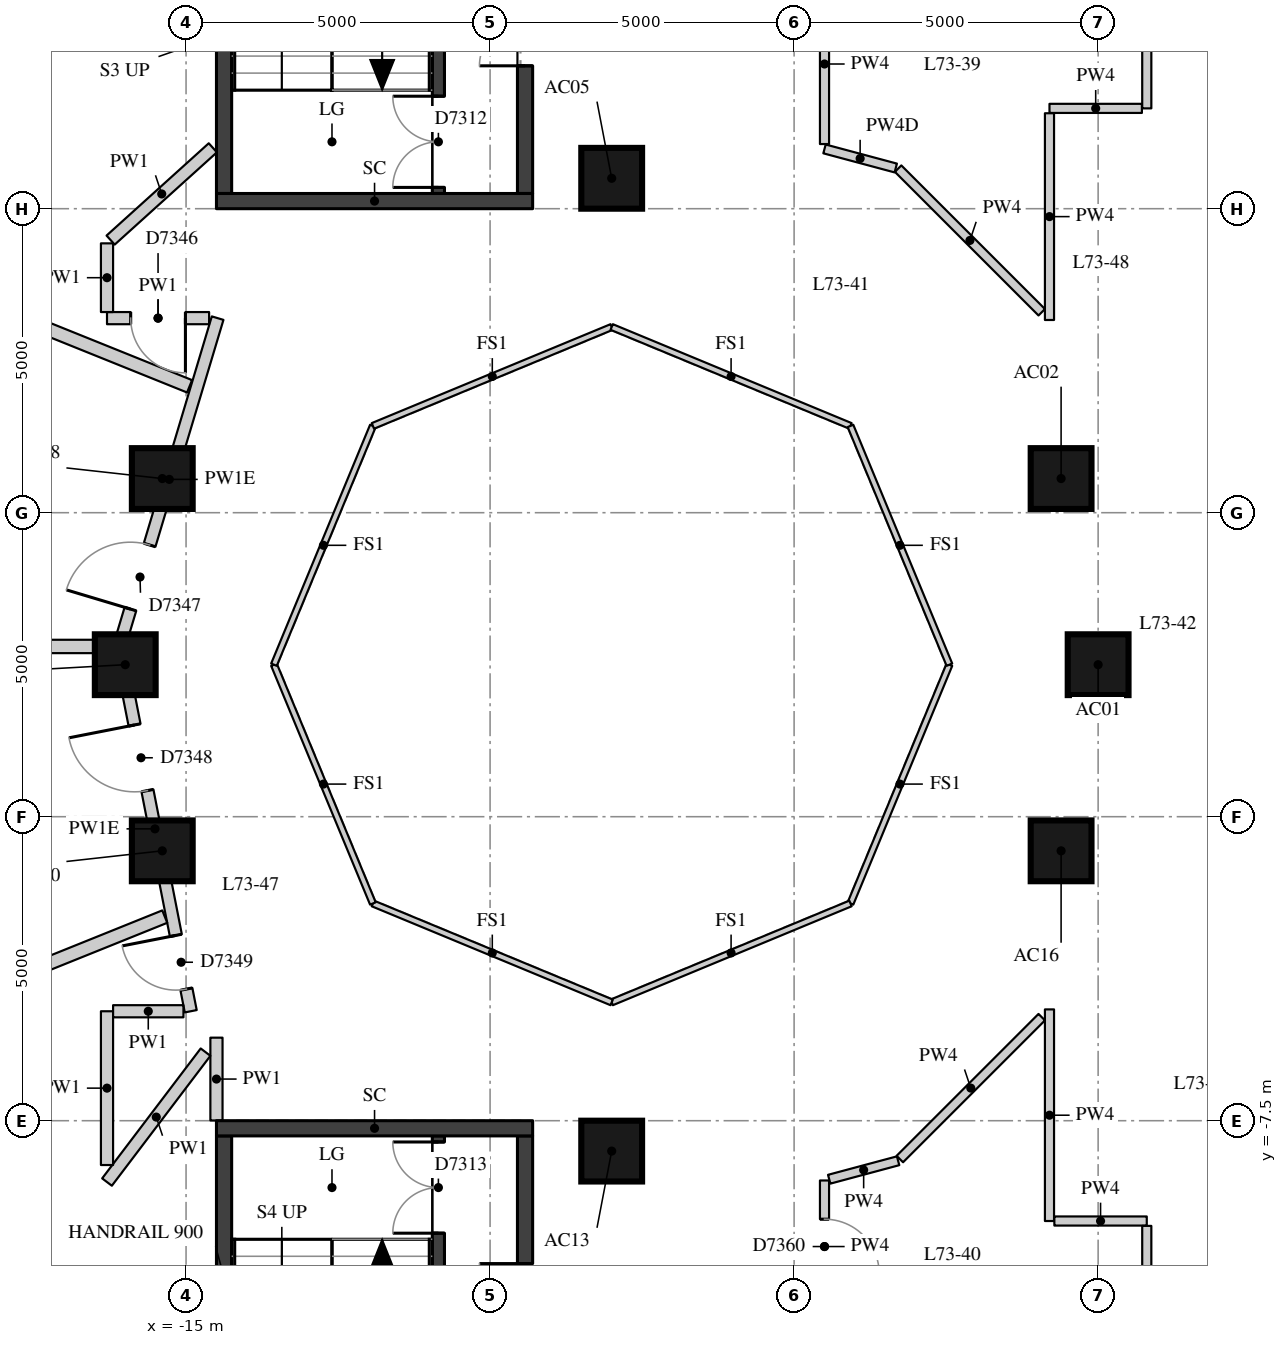
"""IFC4 building model, lengths in metres.
Left out: names, types, materials, properties, quantities, classifications, styles, units other than length and angle.
Written with IfcOpenShell. Run it as: python <this file> out.ifc"""

import sys

from ifc_helpers import new_model, si_unit, direction, frame, frame_2d, origin, origin_2d, place, context, subcontext, project, spatial, rectangle, extrude, element, fill, save


model = new_model("IFC4")
c1 = context("Model", 3, precision=1e-05, world=origin(), true_north=direction((0.0, 1.0)))
c2 = subcontext(c1, "Body", "Model", "MODEL_VIEW")
j1 = project(units=[si_unit("LENGTHUNIT", "METRE"), si_unit("PLANEANGLEUNIT", "RADIAN")], contexts=[c1])
p1 = place(None, origin())
s1 = spatial("IfcSite", under=j1, at=p1, CompositionType="ELEMENT")
p2 = place(p1, origin())
s2 = spatial("IfcBuilding", under=s1, at=p2, CompositionType="ELEMENT")
p3 = place(p2, frame((0.0, 0.0, 256.4)))
s3 = spatial("IfcBuildingStorey", under=s2, at=p3, CompositionType="ELEMENT", Elevation=256.4)
for number, where, z_axis, x_axis in (
    (1, (0.0, 0.0, 0.0), (0.0, 0.0, 1.0), (1.0, 0.0, 0.0)),
    (2, (-0.609, 3.062, 0.0), (0.0, 0.0, 1.0), (1.0, 0.0, 0.0)),
    (3, (-8.0, 8.0, 0.0), (0.0, 0.0, 1.0), (1.0, 0.0, 0.0)),
    (4, (-15.391, 3.062, 0.0), (0.0, 0.0, 1.0), (1.0, 0.0, 0.0)),
    (5, (-16.0, 0.0, 0.0), (0.0, 0.0, 1.0), (1.0, 0.0, 0.0)),
    (6, (-15.391, -3.062, 0.0), (0.0, 0.0, 1.0), (1.0, 0.0, 0.0)),
    (7, (-8.0, -8.0, 0.0), (0.0, 0.0, 1.0), (1.0, 0.0, 0.0)),
    (8, (-0.609, -3.062, 0.0), (0.0, 0.0, 1.0), (1.0, 0.0, 0.0)),
):
    element("IfcColumn", number, at=place(p3, frame(where, z_axis=z_axis, x_axis=x_axis)), inside=s3, PredefinedType="COLUMN", context=c2, shape_type="SweptSolid", body=[
        extrude(rectangle(XDim=1.0, YDim=1.0, at=origin_2d()), origin(), (0.0, 0.0, 1.0), 3.3),
    ])
p4 = place(p3, frame((-10.85, 7.75, 0.0), z_axis=(0.0, 0.0, 1.0), x_axis=(0.0, 1.0, 0.0)))
e9 = element("IfcWall", 9, at=p4, inside=s3, PredefinedType="SHEAR", context=c2, shape_type="SweptSolid", body=[
    extrude(rectangle(XDim=6.0, YDim=0.2, at=frame_2d((3.0, 0.0))), origin(), (0.0, 0.0, 1.0), 2.95),
])
p5 = place(p4, frame((0.1, 0.0, 0.0)))
e10 = element("IfcOpeningElement", 10, at=p5, cuts=e9, PredefinedType="OPENING", context=c2, shape_type="SweptSolid", body=[
    extrude(rectangle(XDim=1.5, YDim=2.1, at=frame_2d((0.75, 1.05))), frame((0.0, 0.11, 0.0), z_axis=(0.0, -1.0, 0.0), x_axis=(1.0, 0.0, 0.0)), (0.0, 0.0, 1.0), 0.22),
])
p6 = place(p3, frame((-10.85, -13.75, 0.0), z_axis=(0.0, 0.0, 1.0), x_axis=(0.0, 1.0, 0.0)))
e11 = element("IfcWall", 11, at=p6, inside=s3, PredefinedType="SHEAR", context=c2, shape_type="SweptSolid", body=[
    extrude(rectangle(XDim=6.0, YDim=0.2, at=frame_2d((3.0, 0.0))), origin(), (0.0, 0.0, 1.0), 2.95),
])
p7 = place(p6, frame((4.4, 0.0, 0.0)))
e12 = element("IfcOpeningElement", 12, at=p7, cuts=e11, PredefinedType="OPENING", context=c2, shape_type="SweptSolid", body=[
    extrude(rectangle(XDim=1.5, YDim=2.1, at=frame_2d((0.75, 1.05))), frame((0.0, 0.11, 0.0), z_axis=(0.0, -1.0, 0.0), x_axis=(1.0, 0.0, 0.0)), (0.0, 0.0, 1.0), 0.22),
])
p8 = place(p3, frame((-14.375, 7.75, -0.28), z_axis=(0.0, 0.0, 1.0), x_axis=(0.0, 1.0, 0.0)))
e13 = element("IfcWall", 13, at=p8, inside=s3, PredefinedType="SHEAR", context=c2, shape_type="SweptSolid", body=[
    extrude(rectangle(XDim=6.0, YDim=0.25, at=frame_2d((3.0, 0.0))), origin(), (0.0, 0.0, 1.0), 3.23),
])
p9 = place(p3, frame((-9.425, 7.75, -0.28), z_axis=(0.0, 0.0, 1.0), x_axis=(0.0, 1.0, 0.0)))
e14 = element("IfcWall", 14, at=p9, inside=s3, PredefinedType="SHEAR", context=c2, shape_type="SweptSolid", body=[
    extrude(rectangle(XDim=6.0, YDim=0.25, at=frame_2d((3.0, 0.0))), origin(), (0.0, 0.0, 1.0), 3.23),
])
p10 = place(p9, frame((2.1, 0.0, 0.28)))
e15 = element("IfcOpeningElement", 15, at=p10, cuts=e14, PredefinedType="OPENING", context=c2, shape_type="SweptSolid", body=[
    extrude(rectangle(XDim=1.5, YDim=2.1, at=frame_2d((0.75, 1.05))), frame((0.0, 0.135, 0.0), z_axis=(0.0, -1.0, 0.0), x_axis=(1.0, 0.0, 0.0)), (0.0, 0.0, 1.0), 0.27),
])
p11 = place(p3, frame((-14.5, 7.625, -0.28), z_axis=(0.0, 0.0, 1.0), x_axis=(1.0, 0.0, 0.0)))
e16 = element("IfcWall", 16, at=p11, inside=s3, PredefinedType="SHEAR", context=c2, shape_type="SweptSolid", body=[
    extrude(rectangle(XDim=5.2, YDim=0.25, at=frame_2d((2.6, 0.0))), origin(), (0.0, 0.0, 1.0), 3.23),
])
p12 = place(p3, frame((-14.375, -13.75, -0.28), z_axis=(0.0, 0.0, 1.0), x_axis=(0.0, 1.0, 0.0)))
e17 = element("IfcWall", 17, at=p12, inside=s3, PredefinedType="SHEAR", context=c2, shape_type="SweptSolid", body=[
    extrude(rectangle(XDim=6.0, YDim=0.25, at=frame_2d((3.0, 0.0))), origin(), (0.0, 0.0, 1.0), 3.23),
])
p13 = place(p3, frame((-9.425, -13.75, -0.28), z_axis=(0.0, 0.0, 1.0), x_axis=(0.0, 1.0, 0.0)))
e18 = element("IfcWall", 18, at=p13, inside=s3, PredefinedType="SHEAR", context=c2, shape_type="SweptSolid", body=[
    extrude(rectangle(XDim=6.0, YDim=0.25, at=frame_2d((3.0, 0.0))), origin(), (0.0, 0.0, 1.0), 3.23),
])
p14 = place(p13, frame((2.4, 0.0, 0.28)))
e19 = element("IfcOpeningElement", 19, at=p14, cuts=e18, PredefinedType="OPENING", context=c2, shape_type="SweptSolid", body=[
    extrude(rectangle(XDim=1.5, YDim=2.1, at=frame_2d((0.75, 1.05))), frame((0.0, 0.135, 0.0), z_axis=(0.0, -1.0, 0.0), x_axis=(1.0, 0.0, 0.0)), (0.0, 0.0, 1.0), 0.27),
])
p15 = place(p3, frame((-14.5, -7.625, -0.28), z_axis=(0.0, 0.0, 1.0), x_axis=(1.0, 0.0, 0.0)))
e20 = element("IfcWall", 20, at=p15, inside=s3, PredefinedType="SHEAR", context=c2, shape_type="SweptSolid", body=[
    extrude(rectangle(XDim=5.2, YDim=0.25, at=frame_2d((2.6, 0.0))), origin(), (0.0, 0.0, 1.0), 3.23),
])
p16 = place(p3, frame((-14.923, -5.7, 0.0), z_axis=(0.0, 0.0, 1.0), x_axis=(-0.192536596074, 0.981289793676, 0.0)))
e21 = element("IfcWall", 21, at=p16, inside=s3, PredefinedType="PARTITIONING", context=c2, shape_type="SweptSolid", body=[
    extrude(rectangle(XDim=6.115, YDim=0.2, at=frame_2d((3.057, 0.0))), origin(), (0.0, 0.0, 1.0), 2.45),
])
p17 = place(p16, frame((3.699, 0.0, 0.0)))
e22 = element("IfcOpeningElement", 22, at=p17, cuts=e21, PredefinedType="OPENING", context=c2, shape_type="SweptSolid", body=[
    extrude(rectangle(XDim=1.1, YDim=2.1, at=frame_2d((0.55, 1.05))), frame((0.0, 0.11, 0.0), z_axis=(0.0, -1.0, 0.0), x_axis=(1.0, 0.0, 0.0)), (0.0, 0.0, 1.0), 0.22),
])
p18 = place(p16, frame((0.372, 0.0, 0.0)))
e23 = element("IfcOpeningElement", 23, at=p18, cuts=e21, PredefinedType="OPENING", context=c2, shape_type="SweptSolid", body=[
    extrude(rectangle(XDim=0.9, YDim=2.1, at=frame_2d((0.45, 1.05))), frame((0.0, 0.11, 0.0), z_axis=(0.0, -1.0, 0.0), x_axis=(1.0, 0.0, 0.0)), (0.0, 0.0, 1.0), 0.22),
])
p19 = place(p3, frame((-16.071, 0.395, 0.0), z_axis=(0.0, 0.0, 1.0), x_axis=(0.287129472402, 0.957891782029, 0.0)))
e24 = element("IfcWall", 24, at=p19, inside=s3, PredefinedType="PARTITIONING", context=c2, shape_type="SweptSolid", body=[
    extrude(rectangle(XDim=5.538, YDim=0.2, at=frame_2d((2.769, 0.0))), origin(), (0.0, 0.0, 1.0), 2.45),
])
p20 = place(p19, frame((0.543, 0.0, 0.0)))
e25 = element("IfcOpeningElement", 25, at=p20, cuts=e24, PredefinedType="OPENING", context=c2, shape_type="SweptSolid", body=[
    extrude(rectangle(XDim=1.1, YDim=2.1, at=frame_2d((0.55, 1.05))), frame((0.0, 0.11, 0.0), z_axis=(0.0, -1.0, 0.0), x_axis=(1.0, 0.0, 0.0)), (0.0, 0.0, 1.0), 0.22),
])
p21 = place(p3, frame((-14.621, 5.7, 0.0), z_axis=(0.0, 0.0, 1.0), x_axis=(-1.0, 0.0, 0.0)))
e26 = element("IfcWall", 26, at=p21, inside=s3, PredefinedType="PARTITIONING", context=c2, shape_type="SweptSolid", body=[
    extrude(rectangle(XDim=1.679, YDim=0.2, at=frame_2d((0.84, 0.0))), origin(), (0.0, 0.0, 1.0), 2.95),
])
p22 = place(p21, frame((0.39, 0.0, 0.0)))
e27 = element("IfcOpeningElement", 27, at=p22, cuts=e26, PredefinedType="OPENING", context=c2, shape_type="SweptSolid", body=[
    extrude(rectangle(XDim=0.9, YDim=2.1, at=frame_2d((0.45, 1.05))), frame((0.0, 0.11, 0.0), z_axis=(0.0, -1.0, 0.0), x_axis=(1.0, 0.0, 0.0)), (0.0, 0.0, 1.0), 0.22),
])
p23 = place(p3, frame((-16.3, 5.8, 0.0), z_axis=(0.0, 0.0, 1.0), x_axis=(0.0, 1.0, 0.0)))
e28 = element("IfcWall", 28, at=p23, inside=s3, PredefinedType="PARTITIONING", context=c2, shape_type="SweptSolid", body=[
    extrude(rectangle(XDim=1.13, YDim=0.2, at=frame_2d((0.565, 0.0))), origin(), (0.0, 0.0, 1.0), 2.95),
])
p24 = place(p3, frame((-16.24, 6.984, 0.0), z_axis=(0.0, 0.0, 1.0), x_axis=(0.742140692687, 0.67024412885, 0.0)))
e29 = element("IfcWall", 29, at=p24, inside=s3, PredefinedType="PARTITIONING", context=c2, shape_type="SweptSolid", body=[
    extrude(rectangle(XDim=2.265, YDim=0.2, at=frame_2d((1.132, 0.0))), origin(), (0.0, 0.0, 1.0), 2.95),
])
p25 = place(p3, frame((-14.5, -7.496, 0.0), z_axis=(0.0, 0.0, 1.0), x_axis=(0.0, 1.0, 0.0)))
e30 = element("IfcWall", 30, at=p25, inside=s3, PredefinedType="PARTITIONING", context=c2, shape_type="SweptSolid", body=[
    extrude(rectangle(XDim=1.362, YDim=0.2, at=frame_2d((0.681, 0.0))), origin(), (0.0, 0.0, 1.0), 2.95),
])
p26 = place(p3, frame((-14.679, -6.372, 0.0), z_axis=(0.0, 0.0, 1.0), x_axis=(-0.604258962547, -0.796787993247, 0.0)))
e31 = element("IfcWall", 31, at=p26, inside=s3, PredefinedType="PARTITIONING", context=c2, shape_type="SweptSolid", body=[
    extrude(rectangle(XDim=2.682, YDim=0.2, at=frame_2d((1.341, 0.0))), origin(), (0.0, 0.0, 1.0), 2.95),
])
p27 = place(p3, frame((-16.3, -8.229, 0.0), z_axis=(0.0, 0.0, 1.0), x_axis=(0.0, 1.0, 0.0)))
e32 = element("IfcWall", 32, at=p27, inside=s3, PredefinedType="PARTITIONING", context=c2, shape_type="SweptSolid", body=[
    extrude(rectangle(XDim=2.529, YDim=0.2, at=frame_2d((1.265, 0.0))), origin(), (0.0, 0.0, 1.0), 2.95),
])
p28 = place(p3, frame((-16.2, -5.7, 0.0), z_axis=(0.0, 0.0, 1.0), x_axis=(1.0, 0.0, 0.0)))
e33 = element("IfcWall", 33, at=p28, inside=s3, PredefinedType="PARTITIONING", context=c2, shape_type="SweptSolid", body=[
    extrude(rectangle(XDim=1.157, YDim=0.2, at=frame_2d((0.579, 0.0))), origin(), (0.0, 0.0, 1.0), 2.95),
])
p29 = place(p3, frame((0.8, 12.057, 0.0), z_axis=(0.0, 0.0, 1.0), x_axis=(0.0, -1.0, 0.0)))
e34 = element("IfcWall", 34, at=p29, inside=s3, PredefinedType="PARTITIONING", context=c2, shape_type="SweptSolid", body=[
    extrude(rectangle(XDim=2.907, YDim=0.15, at=frame_2d((1.454, 0.0))), origin(), (0.0, 0.0, 1.0), 2.95),
])
p30 = place(p29, frame((1.003, 0.0, 0.0)))
e35 = element("IfcOpeningElement", 35, at=p30, cuts=e34, PredefinedType="OPENING", context=c2, shape_type="SweptSolid", body=[
    extrude(rectangle(XDim=0.9, YDim=2.1, at=frame_2d((0.45, 1.05))), frame((0.0, 0.085, 0.0), z_axis=(0.0, -1.0, 0.0), x_axis=(1.0, 0.0, 0.0)), (0.0, 0.0, 1.0), 0.17),
])
p31 = place(p3, frame((0.72, 9.15, 0.0), z_axis=(0.0, 0.0, 1.0), x_axis=(-1.0, 0.0, 0.0)))
e36 = element("IfcWall", 36, at=p31, inside=s3, PredefinedType="PARTITIONING", context=c2, shape_type="SweptSolid", body=[
    extrude(rectangle(XDim=1.52, YDim=0.15, at=frame_2d((0.76, 0.0))), origin(), (0.0, 0.0, 1.0), 2.95),
])
p32 = place(p3, frame((-0.8, 9.07, 0.0), z_axis=(0.0, 0.0, 1.0), x_axis=(0.0, -1.0, 0.0)))
e37 = element("IfcWall", 37, at=p32, inside=s3, PredefinedType="PARTITIONING", context=c2, shape_type="SweptSolid", body=[
    extrude(rectangle(XDim=3.4, YDim=0.15, at=frame_2d((1.7, 0.0))), origin(), (0.0, 0.0, 1.0), 2.95),
])
p33 = place(p3, frame((-0.927, 5.797, 0.0), z_axis=(0.0, 0.0, 1.0), x_axis=(-0.707106781187, 0.707106781187, 0.0)))
e38 = element("IfcWall", 38, at=p33, inside=s3, PredefinedType="PARTITIONING", context=c2, shape_type="SweptSolid", body=[
    extrude(rectangle(XDim=3.341, YDim=0.15, at=frame_2d((1.67, 0.0))), origin(), (0.0, 0.0, 1.0), 2.95),
])
p34 = place(p3, frame((-3.328, 8.169, 0.0), z_axis=(0.0, 0.0, 1.0), x_axis=(-0.965933680277, 0.258789731841, 0.0)))
e39 = element("IfcWall", 39, at=p34, inside=s3, PredefinedType="PARTITIONING", context=c2, shape_type="SweptSolid", body=[
    extrude(rectangle(XDim=1.213, YDim=0.15, at=frame_2d((0.606, 0.0))), origin(), (0.0, 0.0, 1.0), 2.4),
])
p35 = place(p3, frame((-4.5, 8.563, 0.0), z_axis=(0.0, 0.0, 1.0), x_axis=(0.0, 1.0, 0.0)))
e40 = element("IfcWall", 40, at=p35, inside=s3, PredefinedType="PARTITIONING", context=c2, shape_type="SweptSolid", body=[
    extrude(rectangle(XDim=2.633, YDim=0.15, at=frame_2d((1.316, 0.0))), origin(), (0.0, 0.0, 1.0), 2.95),
])
p36 = place(p3, frame((-0.8, -5.669, 0.0), z_axis=(0.0, 0.0, 1.0), x_axis=(0.0, -1.0, 0.0)))
e41 = element("IfcWall", 41, at=p36, inside=s3, PredefinedType="PARTITIONING", context=c2, shape_type="SweptSolid", body=[
    extrude(rectangle(XDim=3.48, YDim=0.15, at=frame_2d((1.74, 0.0))), origin(), (0.0, 0.0, 1.0), 2.95),
])
p37 = place(p3, frame((-0.72, -9.15, 0.0), z_axis=(0.0, 0.0, 1.0), x_axis=(1.0, 0.0, 0.0)))
e42 = element("IfcWall", 42, at=p37, inside=s3, PredefinedType="PARTITIONING", context=c2, shape_type="SweptSolid", body=[
    extrude(rectangle(XDim=1.52, YDim=0.15, at=frame_2d((0.76, 0.0))), origin(), (0.0, 0.0, 1.0), 2.95),
])
p38 = place(p3, frame((0.8, -9.23, 0.0), z_axis=(0.0, 0.0, 1.0), x_axis=(0.0, -1.0, 0.0)))
e43 = element("IfcWall", 43, at=p38, inside=s3, PredefinedType="PARTITIONING", context=c2, shape_type="SweptSolid", body=[
    extrude(rectangle(XDim=1.934, YDim=0.15, at=frame_2d((0.967, 0.0))), origin(), (0.0, 0.0, 1.0), 2.95),
])
p39 = place(p3, frame((-4.5, -10.656, 0.0), z_axis=(0.0, 0.0, 1.0), x_axis=(0.0, 1.0, 0.0)))
e44 = element("IfcWall", 44, at=p39, inside=s3, PredefinedType="PARTITIONING", context=c2, shape_type="SweptSolid", body=[
    extrude(rectangle(XDim=2.173, YDim=0.15, at=frame_2d((1.087, 0.0))), origin(), (0.0, 0.0, 1.0), 2.95),
])
p40 = place(p39, frame((0.637, 0.0, 0.0)))
e45 = element("IfcOpeningElement", 45, at=p40, cuts=e44, PredefinedType="OPENING", context=c2, shape_type="SweptSolid", body=[
    extrude(rectangle(XDim=0.9, YDim=2.1, at=frame_2d((0.45, 1.05))), frame((0.0, 0.085, 0.0), z_axis=(0.0, -1.0, 0.0), x_axis=(1.0, 0.0, 0.0)), (0.0, 0.0, 1.0), 0.17),
])
p41 = place(p3, frame((-4.423, -8.463, 0.0), z_axis=(0.0, 0.0, 1.0), x_axis=(0.965916469839, 0.258853961327, 0.0)))
e46 = element("IfcWall", 46, at=p41, inside=s3, PredefinedType="PARTITIONING", context=c2, shape_type="SweptSolid", body=[
    extrude(rectangle(XDim=1.173, YDim=0.15, at=frame_2d((0.587, 0.0))), origin(), (0.0, 0.0, 1.0), 2.95),
])
p42 = place(p3, frame((-3.261, -8.131, 0.0), z_axis=(0.0, 0.0, 1.0), x_axis=(0.707106781187, 0.707106781187, 0.0)))
e47 = element("IfcWall", 47, at=p42, inside=s3, PredefinedType="PARTITIONING", context=c2, shape_type="SweptSolid", body=[
    extrude(rectangle(XDim=3.3, YDim=0.15, at=frame_2d((1.65, 0.0))), origin(), (0.0, 0.0, 1.0), 2.95),
])
p43 = place(p3, frame((-22.004, 7.424, 0.0), z_axis=(0.0, 0.0, 1.0), x_axis=(0.927533826991, -0.373739213607, 0.0)))
e48 = element("IfcWall", 48, at=p43, inside=s3, PredefinedType="PARTITIONING", context=c2, shape_type="SweptSolid", body=[
    extrude(rectangle(XDim=7.614, YDim=0.22, at=frame_2d((3.807, 0.0))), origin(), (0.0, 0.0, 1.0), 2.95),
])
p44 = place(p3, frame((-23.4, 0.3, 0.0), z_axis=(0.0, 0.0, 1.0), x_axis=(1.0, 0.0, 0.0)))
e49 = element("IfcWall", 49, at=p44, inside=s3, PredefinedType="PARTITIONING", context=c2, shape_type="SweptSolid", body=[
    extrude(rectangle(XDim=7.2, YDim=0.22, at=frame_2d((3.6, 0.0))), origin(), (0.0, 0.0, 1.0), 2.4),
])
p45 = place(p3, frame((-22.004, -6.824, 0.0), z_axis=(0.0, 0.0, 1.0), x_axis=(0.927530164265, 0.373748303513, 0.0)))
e50 = element("IfcWall", 50, at=p45, inside=s3, PredefinedType="PARTITIONING", context=c2, shape_type="SweptSolid", body=[
    extrude(rectangle(XDim=7.174, YDim=0.22, at=frame_2d((3.587, 0.0))), origin(), (0.0, 0.0, 1.0), 2.95),
])
for number, where, z_axis, x_axis in (
    (51, (-2.446, 0.0, 0.0), (0.0, 0.0, 1.0), (-0.383, -0.924, 0.0)),
    (52, (-4.073, -3.927, 0.0), (0.0, 0.0, 1.0), (-0.924, -0.383, 0.0)),
    (53, (-8.0, -5.554, 0.0), (0.0, 0.0, 1.0), (-0.924, 0.383, 0.0)),
    (54, (-11.927, -3.927, 0.0), (0.0, 0.0, 1.0), (-0.383, 0.924, 0.0)),
    (55, (-13.554, 0.0, 0.0), (0.0, 0.0, 1.0), (0.383, 0.924, 0.0)),
    (56, (-11.927, 3.927, 0.0), (0.0, 0.0, 1.0), (0.924, 0.383, 0.0)),
    (57, (-8.0, 5.554, 0.0), (0.0, 0.0, 1.0), (0.924, -0.383, 0.0)),
    (58, (-4.073, 3.927, 0.0), (0.0, 0.0, 1.0), (0.383, -0.924, 0.0)),
):
    element("IfcWall", number, at=place(p3, frame(where, z_axis=z_axis, x_axis=x_axis)), inside=s3, PredefinedType="PARTITIONING", context=c2, shape_type="SweptSolid", body=[
        extrude(rectangle(XDim=4.251, YDim=0.1, at=frame_2d((2.125, 0.0))), origin(), (0.0, 0.0, 1.0), 2.95),
    ])
p46 = place(p5, origin())
e59 = element("IfcDoor", 59, at=p46, inside=s3, OperationType="DOUBLE_DOOR_SINGLE_SWING", PredefinedType="DOOR", context=c2, shape_type="SweptSolid", body=[
    extrude(rectangle(XDim=1.5, YDim=2.1, at=frame_2d((0.75, 1.05))), frame((0.0, 0.025, 0.0), z_axis=(0.0, -1.0, 0.0), x_axis=(1.0, 0.0, 0.0)), (0.0, 0.0, 1.0), 0.05),
])
fill(e10, e59)
p47 = place(p7, origin())
e60 = element("IfcDoor", 60, at=p47, inside=s3, OperationType="DOUBLE_DOOR_SINGLE_SWING", PredefinedType="DOOR", context=c2, shape_type="SweptSolid", body=[
    extrude(rectangle(XDim=1.5, YDim=2.1, at=frame_2d((0.75, 1.05))), frame((0.0, 0.025, 0.0), z_axis=(0.0, -1.0, 0.0), x_axis=(1.0, 0.0, 0.0)), (0.0, 0.0, 1.0), 0.05),
])
fill(e12, e60)
p48 = place(p10, origin())
e61 = element("IfcDoor", 61, at=p48, inside=s3, OperationType="DOUBLE_DOOR_SINGLE_SWING", PredefinedType="DOOR", context=c2, shape_type="SweptSolid", body=[
    extrude(rectangle(XDim=1.5, YDim=2.1, at=frame_2d((0.75, 1.05))), frame((0.0, 0.025, 0.0), z_axis=(0.0, -1.0, 0.0), x_axis=(1.0, 0.0, 0.0)), (0.0, 0.0, 1.0), 0.05),
])
fill(e15, e61)
p49 = place(p14, origin())
e62 = element("IfcDoor", 62, at=p49, inside=s3, OperationType="DOUBLE_DOOR_SINGLE_SWING", PredefinedType="DOOR", context=c2, shape_type="SweptSolid", body=[
    extrude(rectangle(XDim=1.5, YDim=2.1, at=frame_2d((0.75, 1.05))), frame((0.0, 0.025, 0.0), z_axis=(0.0, -1.0, 0.0), x_axis=(1.0, 0.0, 0.0)), (0.0, 0.0, 1.0), 0.05),
])
fill(e19, e62)
p50 = place(p22, origin())
e63 = element("IfcDoor", 63, at=p50, inside=s3, OperationType="SINGLE_SWING_LEFT", PredefinedType="DOOR", context=c2, shape_type="SweptSolid", body=[
    extrude(rectangle(XDim=0.9, YDim=2.1, at=frame_2d((0.45, 1.05))), frame((0.0, 0.025, 0.0), z_axis=(0.0, -1.0, 0.0), x_axis=(1.0, 0.0, 0.0)), (0.0, 0.0, 1.0), 0.05),
])
fill(e27, e63)
p51 = place(p20, origin())
e64 = element("IfcDoor", 64, at=p51, inside=s3, OperationType="SINGLE_SWING_LEFT", PredefinedType="DOOR", context=c2, shape_type="SweptSolid", body=[
    extrude(rectangle(XDim=1.1, YDim=2.1, at=frame_2d((0.55, 1.05))), frame((0.0, 0.025, 0.0), z_axis=(0.0, -1.0, 0.0), x_axis=(1.0, 0.0, 0.0)), (0.0, 0.0, 1.0), 0.05),
])
fill(e25, e64)
p52 = place(p17, origin())
e65 = element("IfcDoor", 65, at=p52, inside=s3, OperationType="SINGLE_SWING_RIGHT", PredefinedType="DOOR", context=c2, shape_type="SweptSolid", body=[
    extrude(rectangle(XDim=1.1, YDim=2.1, at=frame_2d((0.55, 1.05))), frame((0.0, 0.025, 0.0), z_axis=(0.0, -1.0, 0.0), x_axis=(1.0, 0.0, 0.0)), (0.0, 0.0, 1.0), 0.05),
])
fill(e22, e65)
p53 = place(p18, origin())
e66 = element("IfcDoor", 66, at=p53, inside=s3, OperationType="SINGLE_SWING_RIGHT", PredefinedType="DOOR", context=c2, shape_type="SweptSolid", body=[
    extrude(rectangle(XDim=0.9, YDim=2.1, at=frame_2d((0.45, 1.05))), frame((0.0, 0.025, 0.0), z_axis=(0.0, -1.0, 0.0), x_axis=(1.0, 0.0, 0.0)), (0.0, 0.0, 1.0), 0.05),
])
fill(e23, e66)
p54 = place(p40, origin())
e67 = element("IfcDoor", 67, at=p54, inside=s3, OperationType="SINGLE_SWING_RIGHT", PredefinedType="DOOR", context=c2, shape_type="SweptSolid", body=[
    extrude(rectangle(XDim=0.9, YDim=2.1, at=frame_2d((0.45, 1.05))), frame((0.0, 0.025, 0.0), z_axis=(0.0, -1.0, 0.0), x_axis=(1.0, 0.0, 0.0)), (0.0, 0.0, 1.0), 0.05),
])
fill(e45, e67)
save(model, sys.argv[1])
